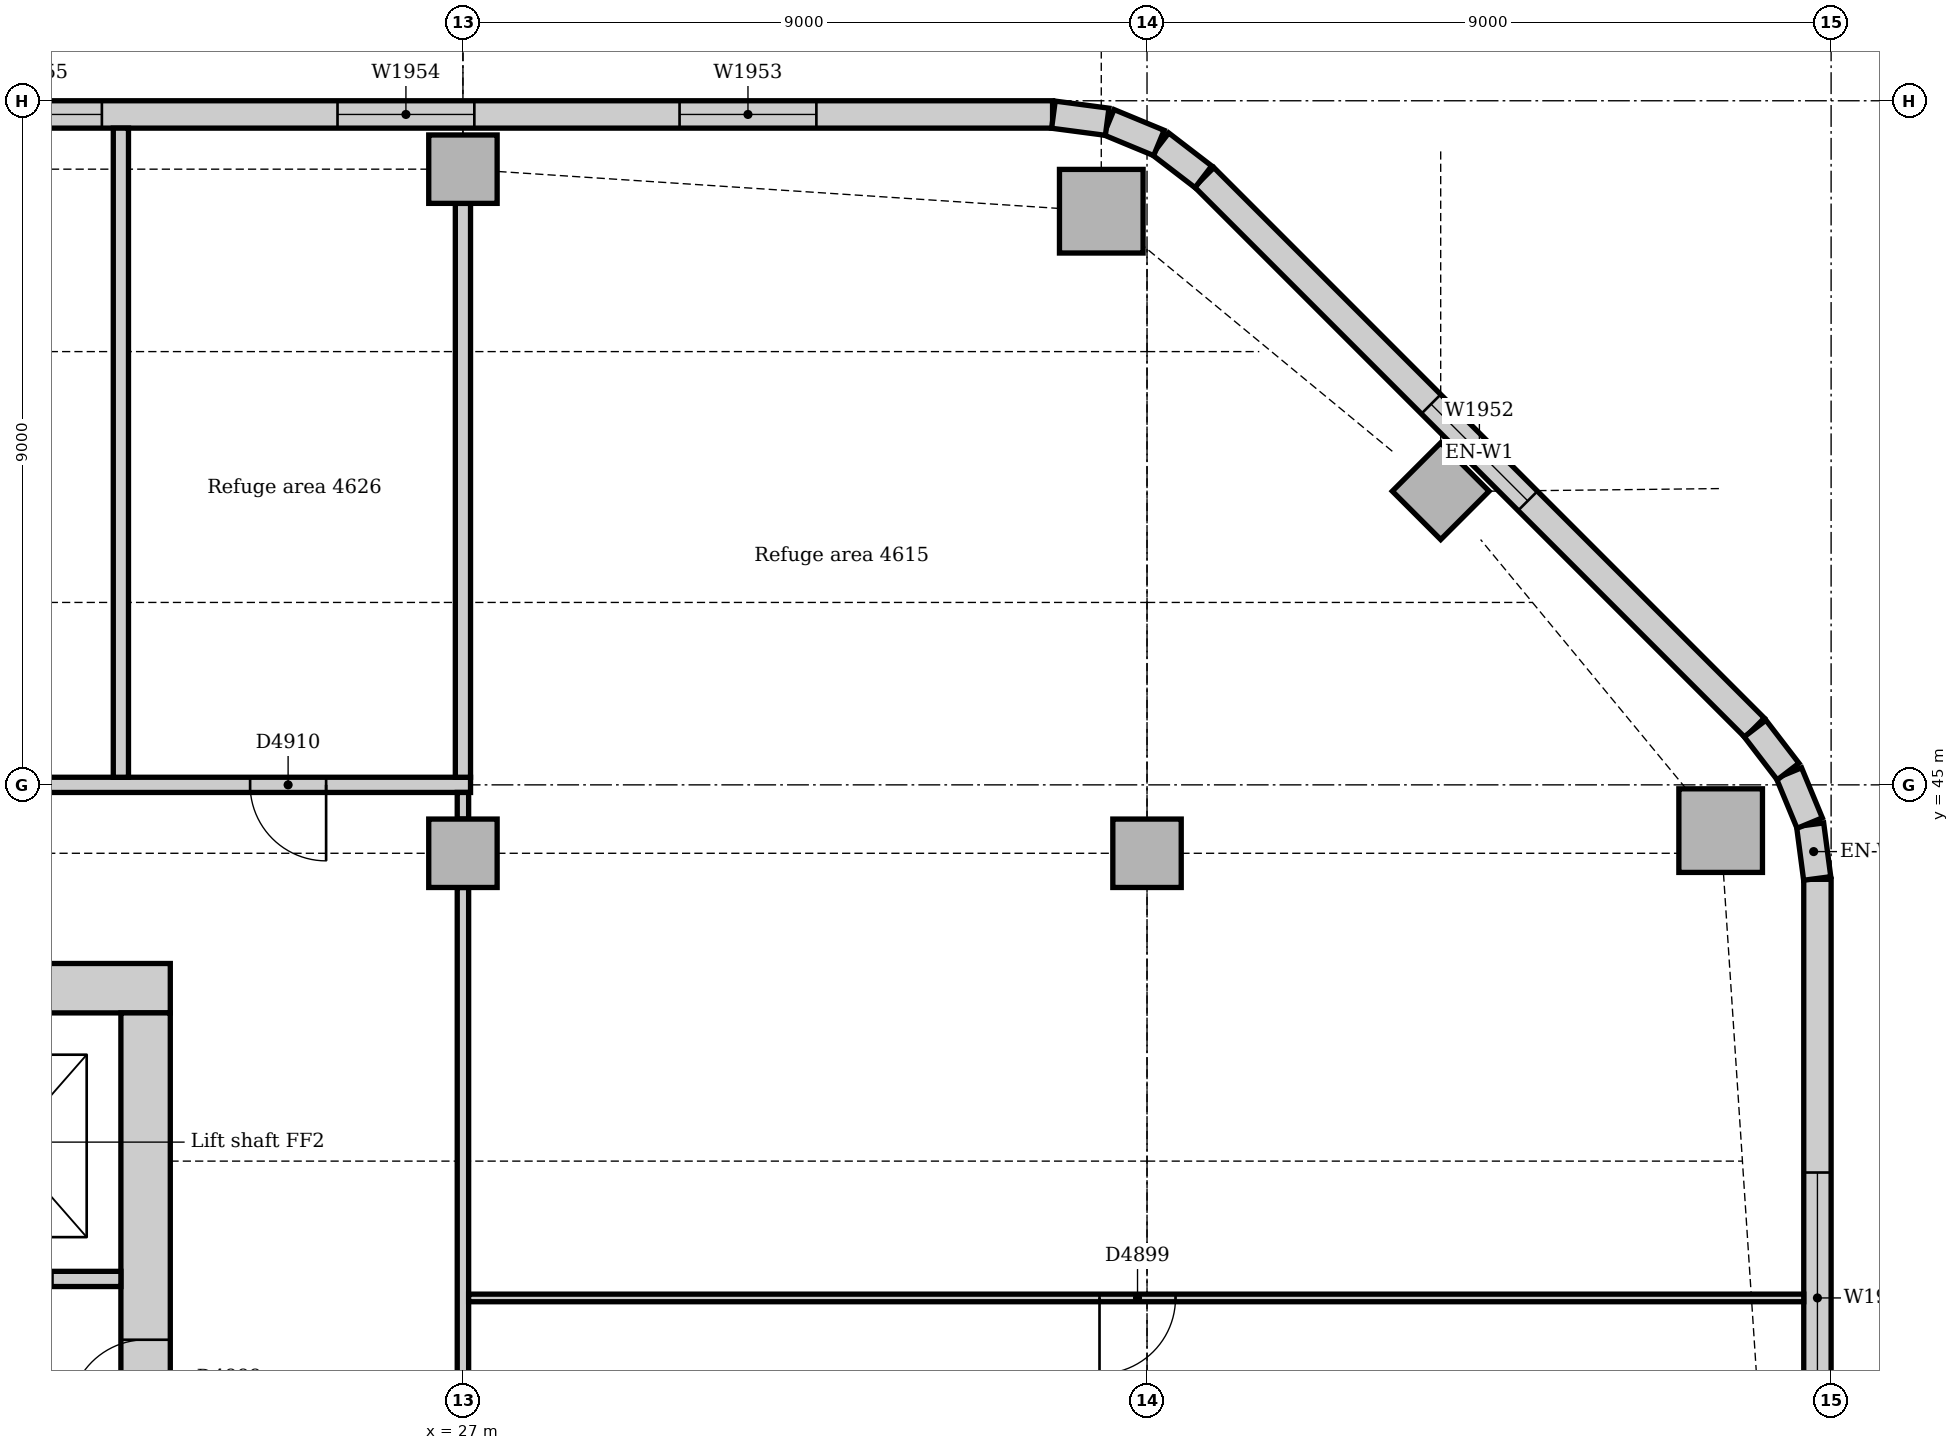
"""IFC4 building model, lengths in metres.
Left out: names, types, materials, properties, quantities, classifications, styles, units other than length and angle.
Written with IfcOpenShell. Run it as: python <this file> out.ifc"""

import sys

from ifc_helpers import new_model, si_unit, direction, frame, frame_2d, origin, origin_2d, place, context, subcontext, project, spatial, rectangle, extrude, element, fill, save


model = new_model("IFC4")
c1 = context("Model", 3, precision=1e-05, world=origin(), true_north=direction((0.0, 1.0)))
c2 = subcontext(c1, "Body", "Model", "MODEL_VIEW")
j1 = project(units=[si_unit("LENGTHUNIT", "METRE"), si_unit("PLANEANGLEUNIT", "RADIAN")], contexts=[c1])
p1 = place(None, origin())
s1 = spatial("IfcSite", under=j1, at=p1, CompositionType="ELEMENT")
p2 = place(p1, origin())
s2 = spatial("IfcBuilding", under=s1, at=p2, CompositionType="ELEMENT")
p3 = place(p2, frame((0.0, 0.0, 193.0)))
s3 = spatial("IfcBuildingStorey", under=s2, at=p3, CompositionType="ELEMENT", Elevation=193.0)
p4 = place(p3, frame((23.15, 42.325, 0.0), z_axis=(0.0, 0.0, 1.0), x_axis=(-1.0, 0.0, 0.0)))
e1 = element("IfcWall", 1, at=p4, inside=s3, PredefinedType="SOLIDWALL", context=c2, shape_type="SweptSolid", body=[
    extrude(rectangle(XDim=19.25, YDim=0.65, at=frame_2d((9.625, 0.0))), origin(), (0.0, 0.0, 1.0), 5.0),
])
p5 = place(p3, frame((22.825, 31.5, 0.0), z_axis=(0.0, 0.0, 1.0), x_axis=(0.0, 1.0, 0.0)))
e2 = element("IfcWall", 2, at=p5, inside=s3, PredefinedType="SOLIDWALL", context=c2, shape_type="SweptSolid", body=[
    extrude(rectangle(XDim=10.5, YDim=0.65, at=frame_2d((5.25, 0.0))), origin(), (0.0, 0.0, 1.0), 5.0),
])
p6 = place(p5, frame((3.15, 0.0, 0.0)))
e3 = element("IfcOpeningElement", 3, at=p6, cuts=e2, PredefinedType="OPENING", context=c2, shape_type="SweptSolid", body=[
    extrude(rectangle(XDim=1.0, YDim=2.1, at=frame_2d((0.5, 1.05))), frame((0.0, 0.335, 0.0), z_axis=(0.0, -1.0, 0.0), x_axis=(1.0, 0.0, 0.0)), (0.0, 0.0, 1.0), 0.67),
])
p7 = place(p5, frame((5.2, 0.0, 0.0)))
e4 = element("IfcOpeningElement", 4, at=p7, cuts=e2, PredefinedType="OPENING", context=c2, shape_type="SweptSolid", body=[
    extrude(rectangle(XDim=1.0, YDim=2.1, at=frame_2d((0.5, 1.05))), frame((0.0, 0.335, 0.0), z_axis=(0.0, -1.0, 0.0), x_axis=(1.0, 0.0, 0.0)), (0.0, 0.0, 1.0), 0.67),
])
for number, where, z_axis, x_axis in (
    (5, (43.547, 44.398, 0.0), (0.0, 0.0, 1.0), (1.0, 0.0, 0.0)),
    (6, (35.398, 52.547, 0.0), (0.0, 0.0, 1.0), (1.0, 0.0, 0.0)),
):
    element("IfcColumn", number, at=place(p3, frame(where, z_axis=z_axis, x_axis=x_axis)), inside=s3, PredefinedType="COLUMN", context=c2, shape_type="SweptSolid", body=[
        extrude(rectangle(XDim=1.1, YDim=1.1, at=origin_2d()), origin(), (0.0, 0.0, 1.0), 4.85),
    ])
for number, where, z_axis, x_axis in (
    (7, (39.864, 48.864, 0.0), (0.0, 0.0, 1.0), (0.707, 0.707, 0.0)),
    (8, (27.0, 53.1, 0.0), (0.0, 0.0, 1.0), (1.0, 0.0, 0.0)),
    (9, (27.0, 44.1, 0.0), (0.0, 0.0, 1.0), (1.0, 0.0, 0.0)),
    (10, (36.0, 44.1, 0.0), (0.0, 0.0, 1.0), (1.0, 0.0, 0.0)),
):
    element("IfcColumn", number, at=place(p3, frame(where, z_axis=z_axis, x_axis=x_axis)), inside=s3, PredefinedType="COLUMN", context=c2, shape_type="SweptSolid", body=[
        extrude(rectangle(XDim=0.9, YDim=0.9, at=origin_2d()), origin(), (0.0, 0.0, 1.0), 4.85),
    ])
p8 = place(p3, frame((44.82, 19.243, 0.0), z_axis=(0.0, 0.0, 1.0), x_axis=(0.0, 1.0, 0.0)))
e11 = element("IfcWall", 11, at=p8, inside=s3, PredefinedType="STANDARD", context=c2, shape_type="SweptSolid", body=[
    extrude(rectangle(XDim=24.515, YDim=0.36, at=frame_2d((12.257, 0.0))), origin(), (0.0, 0.0, 1.0), 4.85),
])
p9 = place(p8, frame((3.857, 0.0, 0.9)))
e12 = element("IfcOpeningElement", 12, at=p9, cuts=e11, PredefinedType="OPENING", context=c2, shape_type="SweptSolid", body=[
    extrude(rectangle(XDim=3.3, YDim=2.2, at=frame_2d((1.65, 1.1))), frame((0.0, 0.19, 0.0), z_axis=(0.0, -1.0, 0.0), x_axis=(1.0, 0.0, 0.0)), (0.0, 0.0, 1.0), 0.38),
])
p10 = place(p8, frame((8.357, 0.0, 0.9)))
e13 = element("IfcOpeningElement", 13, at=p10, cuts=e11, PredefinedType="OPENING", context=c2, shape_type="SweptSolid", body=[
    extrude(rectangle(XDim=3.3, YDim=2.2, at=frame_2d((1.65, 1.1))), frame((0.0, 0.19, 0.0), z_axis=(0.0, -1.0, 0.0), x_axis=(1.0, 0.0, 0.0)), (0.0, 0.0, 1.0), 0.38),
])
p11 = place(p8, frame((12.857, 0.0, 0.9)))
e14 = element("IfcOpeningElement", 14, at=p11, cuts=e11, PredefinedType="OPENING", context=c2, shape_type="SweptSolid", body=[
    extrude(rectangle(XDim=3.3, YDim=2.2, at=frame_2d((1.65, 1.1))), frame((0.0, 0.19, 0.0), z_axis=(0.0, -1.0, 0.0), x_axis=(1.0, 0.0, 0.0)), (0.0, 0.0, 1.0), 0.38),
])
p12 = place(p8, frame((17.357, 0.0, 0.9)))
e15 = element("IfcOpeningElement", 15, at=p12, cuts=e11, PredefinedType="OPENING", context=c2, shape_type="SweptSolid", body=[
    extrude(rectangle(XDim=3.3, YDim=2.2, at=frame_2d((1.65, 1.1))), frame((0.0, 0.19, 0.0), z_axis=(0.0, -1.0, 0.0), x_axis=(1.0, 0.0, 0.0)), (0.0, 0.0, 1.0), 0.38),
])
p13 = place(p3, frame((43.994, 45.751, 0.0), z_axis=(0.0, 0.0, 1.0), x_axis=(-0.707106781187, 0.707106781187, 0.0)))
e16 = element("IfcWall", 16, at=p13, inside=s3, PredefinedType="STANDARD", context=c2, shape_type="SweptSolid", body=[
    extrude(rectangle(XDim=10.243, YDim=0.36, at=frame_2d((5.121, 0.0))), origin(), (0.0, 0.0, 1.0), 3.25),
])
p14 = place(p13, frame((4.221, 0.0, 1.2)))
e17 = element("IfcOpeningElement", 17, at=p14, cuts=e16, PredefinedType="OPENING", context=c2, shape_type="SweptSolid", body=[
    extrude(rectangle(XDim=1.8, YDim=1.2, at=frame_2d((0.9, 0.6))), frame((0.0, 0.19, 0.0), z_axis=(0.0, -1.0, 0.0), x_axis=(1.0, 0.0, 0.0)), (0.0, 0.0, 1.0), 0.38),
])
p15 = place(p3, frame((34.757, 53.82, 0.0), z_axis=(0.0, 0.0, 1.0), x_axis=(-1.0, 0.0, 0.0)))
e18 = element("IfcWall", 18, at=p15, inside=s3, PredefinedType="STANDARD", context=c2, shape_type="SweptSolid", body=[
    extrude(rectangle(XDim=30.515, YDim=0.36, at=frame_2d((15.257, 0.0))), origin(), (0.0, 0.0, 1.0), 3.25),
])
p16 = place(p15, frame((3.107, 0.0, 1.2)))
e19 = element("IfcOpeningElement", 19, at=p16, cuts=e18, PredefinedType="OPENING", context=c2, shape_type="SweptSolid", body=[
    extrude(rectangle(XDim=1.8, YDim=1.2, at=frame_2d((0.9, 0.6))), frame((0.0, 0.19, 0.0), z_axis=(0.0, -1.0, 0.0), x_axis=(1.0, 0.0, 0.0)), (0.0, 0.0, 1.0), 0.38),
])
p17 = place(p15, frame((7.607, 0.0, 1.2)))
e20 = element("IfcOpeningElement", 20, at=p17, cuts=e18, PredefinedType="OPENING", context=c2, shape_type="SweptSolid", body=[
    extrude(rectangle(XDim=1.8, YDim=1.2, at=frame_2d((0.9, 0.6))), frame((0.0, 0.19, 0.0), z_axis=(0.0, -1.0, 0.0), x_axis=(1.0, 0.0, 0.0)), (0.0, 0.0, 1.0), 0.38),
])
p18 = place(p15, frame((12.507, 0.0, 1.2)))
e21 = element("IfcOpeningElement", 21, at=p18, cuts=e18, PredefinedType="OPENING", context=c2, shape_type="SweptSolid", body=[
    extrude(rectangle(XDim=1.8, YDim=1.2, at=frame_2d((0.9, 0.6))), frame((0.0, 0.19, 0.0), z_axis=(0.0, -1.0, 0.0), x_axis=(1.0, 0.0, 0.0)), (0.0, 0.0, 1.0), 0.38),
])
p19 = place(p15, frame((16.607, 0.0, 1.2)))
e22 = element("IfcOpeningElement", 22, at=p19, cuts=e18, PredefinedType="OPENING", context=c2, shape_type="SweptSolid", body=[
    extrude(rectangle(XDim=1.8, YDim=1.2, at=frame_2d((0.9, 0.6))), frame((0.0, 0.19, 0.0), z_axis=(0.0, -1.0, 0.0), x_axis=(1.0, 0.0, 0.0)), (0.0, 0.0, 1.0), 0.38),
])
p20 = place(p15, frame((21.507, 0.0, 1.2)))
e23 = element("IfcOpeningElement", 23, at=p20, cuts=e18, PredefinedType="OPENING", context=c2, shape_type="SweptSolid", body=[
    extrude(rectangle(XDim=1.8, YDim=1.2, at=frame_2d((0.9, 0.6))), frame((0.0, 0.19, 0.0), z_axis=(0.0, -1.0, 0.0), x_axis=(1.0, 0.0, 0.0)), (0.0, 0.0, 1.0), 0.38),
])
p21 = place(p15, frame((25.607, 0.0, 1.2)))
e24 = element("IfcOpeningElement", 24, at=p21, cuts=e18, PredefinedType="OPENING", context=c2, shape_type="SweptSolid", body=[
    extrude(rectangle(XDim=1.8, YDim=1.2, at=frame_2d((0.9, 0.6))), frame((0.0, 0.19, 0.0), z_axis=(0.0, -1.0, 0.0), x_axis=(1.0, 0.0, 0.0)), (0.0, 0.0, 1.0), 0.38),
])
for number, where, z_axis, x_axis in (
    (25, (44.817, 43.769, 0.0), (0.0, 0.0, 1.0), (-0.131, 0.991, 0.0)),
    (26, (44.718, 44.497, 0.0), (0.0, 0.0, 1.0), (-0.383, 0.924, 0.0)),
):
    element("IfcWall", number, at=place(p3, frame(where, z_axis=z_axis, x_axis=x_axis)), inside=s3, PredefinedType="STANDARD", context=c2, shape_type="SweptSolid", body=[
        extrude(rectangle(XDim=0.713, YDim=0.36, at=frame_2d((0.356, 0.0))), origin(), (0.0, 0.0, 1.0), 3.25),
    ])
for number, where, z_axis, x_axis in (
    (27, (44.434, 45.175, 0.0), (0.0, 0.0, 1.0), (-0.609, 0.793, 0.0)),
    (28, (36.741, 53.0, 0.0), (0.0, 0.0, 1.0), (-0.793, 0.609, 0.0)),
):
    element("IfcWall", number, at=place(p3, frame(where, z_axis=z_axis, x_axis=x_axis)), inside=s3, PredefinedType="STANDARD", context=c2, shape_type="SweptSolid", body=[
        extrude(rectangle(XDim=0.713, YDim=0.36, at=frame_2d((0.357, 0.0))), origin(), (0.0, 0.0, 1.0), 3.25),
    ])
for number, where, z_axis, x_axis in (
    (29, (36.156, 53.445, 0.0), (0.0, 0.0, 1.0), (-0.924, 0.383, 0.0)),
    (30, (35.476, 53.724, 0.0), (0.0, 0.0, 1.0), (-0.991, 0.131, 0.0)),
):
    element("IfcWall", number, at=place(p3, frame(where, z_axis=z_axis, x_axis=x_axis)), inside=s3, PredefinedType="STANDARD", context=c2, shape_type="SweptSolid", body=[
        extrude(rectangle(XDim=0.713, YDim=0.36, at=frame_2d((0.356, 0.0))), origin(), (0.0, 0.0, 1.0), 3.25),
    ])
p22 = place(p3, frame((0.36, 45.0, 0.0), z_axis=(0.0, 0.0, 1.0), x_axis=(1.0, 0.0, 0.0)))
e31 = element("IfcWall", 31, at=p22, inside=s3, PredefinedType="PARTITIONING", context=c2, shape_type="SweptSolid", body=[
    extrude(rectangle(XDim=26.74, YDim=0.2, at=frame_2d((13.37, 0.0))), origin(), (0.0, 0.0, 1.0), 4.85),
])
p23 = place(p22, frame((6.15, 0.0, 0.0)))
e32 = element("IfcOpeningElement", 32, at=p23, cuts=e31, PredefinedType="OPENING", context=c2, shape_type="SweptSolid", body=[
    extrude(rectangle(XDim=1.0, YDim=2.1, at=frame_2d((0.5, 1.05))), frame((0.0, 0.11, 0.0), z_axis=(0.0, -1.0, 0.0), x_axis=(1.0, 0.0, 0.0)), (0.0, 0.0, 1.0), 0.22),
])
p24 = place(p22, frame((16.19, 0.0, 0.0)))
e33 = element("IfcOpeningElement", 33, at=p24, cuts=e31, PredefinedType="OPENING", context=c2, shape_type="SweptSolid", body=[
    extrude(rectangle(XDim=1.0, YDim=2.1, at=frame_2d((0.5, 1.05))), frame((0.0, 0.11, 0.0), z_axis=(0.0, -1.0, 0.0), x_axis=(1.0, 0.0, 0.0)), (0.0, 0.0, 1.0), 0.22),
])
p25 = place(p22, frame((23.84, 0.0, 0.0)))
e34 = element("IfcOpeningElement", 34, at=p25, cuts=e31, PredefinedType="OPENING", context=c2, shape_type="SweptSolid", body=[
    extrude(rectangle(XDim=1.0, YDim=2.1, at=frame_2d((0.5, 1.05))), frame((0.0, 0.11, 0.0), z_axis=(0.0, -1.0, 0.0), x_axis=(1.0, 0.0, 0.0)), (0.0, 0.0, 1.0), 0.22),
])
p26 = place(p3, frame((22.5, 45.1, 0.0), z_axis=(0.0, 0.0, 1.0), x_axis=(0.0, 1.0, 0.0)))
e35 = element("IfcWall", 35, at=p26, inside=s3, PredefinedType="PARTITIONING", context=c2, shape_type="SweptSolid", body=[
    extrude(rectangle(XDim=8.54, YDim=0.2, at=frame_2d((4.27, 0.0))), origin(), (0.0, 0.0, 1.0), 4.85),
])
p27 = place(p3, frame((27.0, 45.1, 0.0), z_axis=(0.0, 0.0, 1.0), x_axis=(0.0, 1.0, 0.0)))
e36 = element("IfcWall", 36, at=p27, inside=s3, PredefinedType="PARTITIONING", context=c2, shape_type="SweptSolid", body=[
    extrude(rectangle(XDim=7.55, YDim=0.2, at=frame_2d((3.775, 0.0))), origin(), (0.0, 0.0, 1.0), 4.35),
])
p28 = place(p3, frame((16.4, 38.5, 0.0), z_axis=(0.0, 0.0, 1.0), x_axis=(1.0, 0.0, 0.0)))
e37 = element("IfcWall", 37, at=p28, inside=s3, PredefinedType="PARTITIONING", context=c2, shape_type="SweptSolid", body=[
    extrude(rectangle(XDim=6.1, YDim=0.2, at=frame_2d((3.05, 0.0))), origin(), (0.0, 0.0, 1.0), 4.85),
])
p29 = place(p28, frame((1.0, 0.0, 0.0)))
e38 = element("IfcOpeningElement", 38, at=p29, cuts=e37, PredefinedType="OPENING", context=c2, shape_type="SweptSolid", body=[
    extrude(rectangle(XDim=1.2, YDim=2.1, at=frame_2d((0.6, 1.05))), frame((0.0, 0.11, 0.0), z_axis=(0.0, -1.0, 0.0), x_axis=(1.0, 0.0, 0.0)), (0.0, 0.0, 1.0), 0.22),
])
p30 = place(p28, frame((4.0, 0.0, 0.0)))
e39 = element("IfcOpeningElement", 39, at=p30, cuts=e37, PredefinedType="OPENING", context=c2, shape_type="SweptSolid", body=[
    extrude(rectangle(XDim=1.2, YDim=2.1, at=frame_2d((0.6, 1.05))), frame((0.0, 0.11, 0.0), z_axis=(0.0, -1.0, 0.0), x_axis=(1.0, 0.0, 0.0)), (0.0, 0.0, 1.0), 0.22),
])
p31 = place(p3, frame((27.0, 36.45, 0.0), z_axis=(0.0, 0.0, 1.0), x_axis=(0.0, 1.0, 0.0)))
e40 = element("IfcWall", 40, at=p31, inside=s3, PredefinedType="PARTITIONING", context=c2, shape_type="SweptSolid", body=[
    extrude(rectangle(XDim=7.2, YDim=0.15, at=frame_2d((3.6, 0.0))), origin(), (0.0, 0.0, 1.0), 4.35),
])
p32 = place(p3, frame((27.0, 44.55, 0.0), z_axis=(0.0, 0.0, 1.0), x_axis=(0.0, 1.0, 0.0)))
e41 = element("IfcWall", 41, at=p32, inside=s3, PredefinedType="PARTITIONING", context=c2, shape_type="SweptSolid", body=[
    extrude(rectangle(XDim=0.35, YDim=0.15, at=frame_2d((0.175, 0.0))), origin(), (0.0, 0.0, 1.0), 4.85),
])
p33 = place(p3, frame((27.075, 38.25, 0.0), z_axis=(0.0, 0.0, 1.0), x_axis=(1.0, 0.0, 0.0)))
e42 = element("IfcWall", 42, at=p33, inside=s3, PredefinedType="PARTITIONING", context=c2, shape_type="SweptSolid", body=[
    extrude(rectangle(XDim=17.565, YDim=0.1, at=frame_2d((8.783, 0.0))), origin(), (0.0, 0.0, 1.0), 4.85),
])
p34 = place(p33, frame((8.3, 0.0, 0.0)))
e43 = element("IfcOpeningElement", 43, at=p34, cuts=e42, PredefinedType="OPENING", context=c2, shape_type="SweptSolid", body=[
    extrude(rectangle(XDim=1.0, YDim=2.1, at=frame_2d((0.5, 1.05))), frame((0.0, 0.06, 0.0), z_axis=(0.0, -1.0, 0.0), x_axis=(1.0, 0.0, 0.0)), (0.0, 0.0, 1.0), 0.12),
])
p35 = place(p12, origin())
e44 = element("IfcWindow", 44, at=p35, inside=s3, PartitioningType="SINGLE_PANEL", PredefinedType="WINDOW", context=c2, shape_type="SweptSolid", body=[
    extrude(rectangle(XDim=3.3, YDim=2.2, at=frame_2d((1.65, 1.1))), frame((0.0, 0.13, 0.0), z_axis=(0.0, -1.0, 0.0), x_axis=(1.0, 0.0, 0.0)), (0.0, 0.0, 1.0), 0.06),
])
fill(e15, e44)
p36 = place(p14, origin())
e45 = element("IfcWindow", 45, at=p36, inside=s3, PartitioningType="SINGLE_PANEL", PredefinedType="WINDOW", context=c2, shape_type="SweptSolid", body=[
    extrude(rectangle(XDim=1.8, YDim=1.2, at=frame_2d((0.9, 0.6))), frame((0.0, 0.13, 0.0), z_axis=(0.0, -1.0, 0.0), x_axis=(1.0, 0.0, 0.0)), (0.0, 0.0, 1.0), 0.06),
])
fill(e17, e45)
p37 = place(p16, origin())
e46 = element("IfcWindow", 46, at=p37, inside=s3, PartitioningType="SINGLE_PANEL", PredefinedType="WINDOW", context=c2, shape_type="SweptSolid", body=[
    extrude(rectangle(XDim=1.8, YDim=1.2, at=frame_2d((0.9, 0.6))), frame((0.0, 0.13, 0.0), z_axis=(0.0, -1.0, 0.0), x_axis=(1.0, 0.0, 0.0)), (0.0, 0.0, 1.0), 0.06),
])
fill(e19, e46)
p38 = place(p17, origin())
e47 = element("IfcWindow", 47, at=p38, inside=s3, PartitioningType="SINGLE_PANEL", PredefinedType="WINDOW", context=c2, shape_type="SweptSolid", body=[
    extrude(rectangle(XDim=1.8, YDim=1.2, at=frame_2d((0.9, 0.6))), frame((0.0, 0.13, 0.0), z_axis=(0.0, -1.0, 0.0), x_axis=(1.0, 0.0, 0.0)), (0.0, 0.0, 1.0), 0.06),
])
fill(e20, e47)
p39 = place(p18, origin())
e48 = element("IfcWindow", 48, at=p39, inside=s3, PartitioningType="SINGLE_PANEL", PredefinedType="WINDOW", context=c2, shape_type="SweptSolid", body=[
    extrude(rectangle(XDim=1.8, YDim=1.2, at=frame_2d((0.9, 0.6))), frame((0.0, 0.13, 0.0), z_axis=(0.0, -1.0, 0.0), x_axis=(1.0, 0.0, 0.0)), (0.0, 0.0, 1.0), 0.06),
])
fill(e21, e48)
p40 = place(p7, origin())
e49 = element("IfcDoor", 49, at=p40, inside=s3, OperationType="SINGLE_SWING_LEFT", PredefinedType="DOOR", context=c2, shape_type="SweptSolid", body=[
    extrude(rectangle(XDim=1.0, YDim=2.1, at=frame_2d((0.5, 1.05))), frame((0.0, 0.025, 0.0), z_axis=(0.0, -1.0, 0.0), x_axis=(1.0, 0.0, 0.0)), (0.0, 0.0, 1.0), 0.05),
])
fill(e4, e49)
p41 = place(p34, frame((1.0, 0.0, 0.0), z_axis=(0.0, 0.0, 1.0), x_axis=(-1.0, 0.0, 0.0)))
e50 = element("IfcDoor", 50, at=p41, inside=s3, OperationType="SINGLE_SWING_RIGHT", PredefinedType="DOOR", context=c2, shape_type="SweptSolid", body=[
    extrude(rectangle(XDim=1.0, YDim=2.1, at=frame_2d((0.5, 1.05))), frame((0.0, 0.025, 0.0), z_axis=(0.0, -1.0, 0.0), x_axis=(1.0, 0.0, 0.0)), (0.0, 0.0, 1.0), 0.05),
])
fill(e43, e50)
p42 = place(p25, frame((1.0, 0.0, 0.0), z_axis=(0.0, 0.0, 1.0), x_axis=(-1.0, 0.0, 0.0)))
e51 = element("IfcDoor", 51, at=p42, inside=s3, OperationType="SINGLE_SWING_LEFT", PredefinedType="DOOR", context=c2, shape_type="SweptSolid", body=[
    extrude(rectangle(XDim=1.0, YDim=2.1, at=frame_2d((0.5, 1.05))), frame((0.0, 0.025, 0.0), z_axis=(0.0, -1.0, 0.0), x_axis=(1.0, 0.0, 0.0)), (0.0, 0.0, 1.0), 0.05),
])
fill(e34, e51)
save(model, sys.argv[1])
